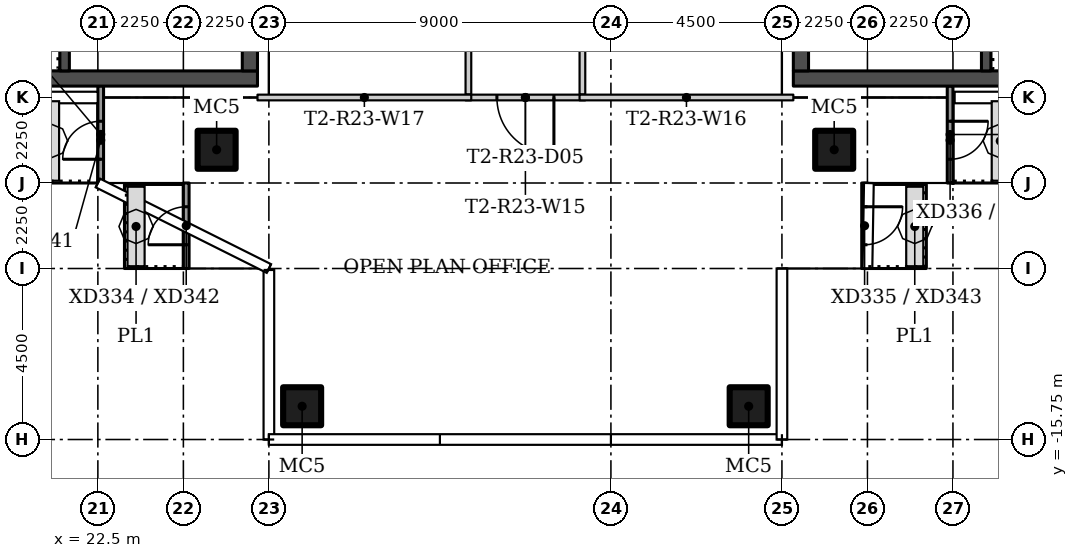
"""IFC4 building model, lengths in metres.
Left out: names, types, materials, properties, quantities, classifications, styles, units other than length and angle.
Written with IfcOpenShell. Run it as: python <this file> out.ifc"""

import sys

from ifc_helpers import new_model, si_unit, direction, frame, frame_2d, origin, origin_2d, place, context, subcontext, project, spatial, rectangle, hollow_rectangle, extrude, element, fill, save


model = new_model("IFC4")
c1 = context("Model", 3, precision=1e-05, world=origin(), true_north=direction((0.0, 1.0)))
c2 = subcontext(c1, "Body", "Model", "MODEL_VIEW")
j1 = project(units=[si_unit("LENGTHUNIT", "METRE"), si_unit("PLANEANGLEUNIT", "RADIAN")], contexts=[c1])
p1 = place(None, origin())
s1 = spatial("IfcSite", under=j1, at=p1, CompositionType="ELEMENT")
p2 = place(p1, origin())
s2 = spatial("IfcBuilding", under=s1, at=p2, CompositionType="ELEMENT")
p3 = place(p2, frame((0.0, 0.0, 210.0)))
s3 = spatial("IfcBuildingStorey", under=s2, at=p3, CompositionType="ELEMENT", Elevation=210.0)
for number, where in (
    (1, (25.625, -8.125, 0.0)),
    (2, (41.875, -8.125, 0.0)),
    (3, (39.625, -14.875, 0.0)),
    (4, (27.875, -14.875, 0.0)),
):
    element("IfcColumn", number, at=place(p3, frame(where)), inside=s3, PredefinedType="COLUMN", context=c2, shape_type="SweptSolid", body=[
        extrude(hollow_rectangle(XDim=1.0, YDim=1.0, WallThickness=0.04, at=origin_2d()), origin(), (0.0, 0.0, 1.0), 3.55),
    ])
p4 = place(p3, frame((32.25, -6.675, 0.0), z_axis=(0.0, 0.0, 1.0), x_axis=(0.0, 1.0, 0.0)))
e5 = element("IfcWall", 5, at=p4, inside=s3, PredefinedType="PARTITIONING", context=c2, shape_type="SweptSolid", body=[
    extrude(rectangle(XDim=6.65, YDim=0.15, at=frame_2d((3.325, 0.0))), origin(), (0.0, 0.0, 1.0), 3.55),
])
p5 = place(p4, frame((2.875, 0.0, 0.0)))
e6 = element("IfcOpeningElement", 6, at=p5, cuts=e5, PredefinedType="OPENING", context=c2, shape_type="SweptSolid", body=[
    extrude(rectangle(XDim=0.9, YDim=2.1, at=frame_2d((0.45, 1.05))), frame((0.0, 0.085, 0.0), z_axis=(0.0, -1.0, 0.0), x_axis=(1.0, 0.0, 0.0)), (0.0, 0.0, 1.0), 0.17),
])
p6 = place(p3, frame((35.25, -0.025, 0.0), z_axis=(0.0, 0.0, 1.0), x_axis=(0.0, -1.0, 0.0)))
e7 = element("IfcWall", 7, at=p6, inside=s3, PredefinedType="PARTITIONING", context=c2, shape_type="SweptSolid", body=[
    extrude(rectangle(XDim=6.65, YDim=0.15, at=frame_2d((3.325, 0.0))), origin(), (0.0, 0.0, 1.0), 3.55),
])
p7 = place(p6, frame((2.875, 0.0, 0.0)))
e8 = element("IfcOpeningElement", 8, at=p7, cuts=e7, PredefinedType="OPENING", context=c2, shape_type="SweptSolid", body=[
    extrude(rectangle(XDim=0.9, YDim=2.1, at=frame_2d((0.45, 1.05))), frame((0.0, 0.085, 0.0), z_axis=(0.0, -1.0, 0.0), x_axis=(1.0, 0.0, 0.0)), (0.0, 0.0, 1.0), 0.17),
])
p8 = place(p3, frame((35.325, -6.75, 0.0), z_axis=(0.0, 0.0, 1.0), x_axis=(-1.0, 0.0, 0.0)))
e9 = element("IfcWall", 9, at=p8, inside=s3, PredefinedType="PARTITIONING", context=c2, shape_type="SweptSolid", body=[
    extrude(rectangle(XDim=3.15, YDim=0.15, at=frame_2d((1.575, 0.0))), origin(), (0.0, 0.0, 1.0), 3.55),
])
p9 = place(p8, frame((0.825, 0.0, 0.0)))
e10 = element("IfcOpeningElement", 10, at=p9, cuts=e9, PredefinedType="OPENING", context=c2, shape_type="SweptSolid", body=[
    extrude(rectangle(XDim=1.5, YDim=2.1, at=frame_2d((0.75, 1.05))), frame((0.0, 0.085, 0.0), z_axis=(0.0, -1.0, 0.0), x_axis=(1.0, 0.0, 0.0)), (0.0, 0.0, 1.0), 0.17),
])
for number, where in (
    (11, (35.175, -6.75, 0.0)),
    (12, (26.7, -6.75, 0.0)),
):
    element("IfcWall", number, at=place(p3, frame(where)), inside=s3, PredefinedType="PARTITIONING", context=c2, shape_type="SweptSolid", body=[
        extrude(rectangle(XDim=5.625, YDim=0.15, at=frame_2d((2.812, 0.0))), origin(), (0.0, 0.0, 1.0), 3.55),
    ])
p10 = place(p3, frame((22.575, -9.0, 0.0), z_axis=(0.0, 0.0, 1.0), x_axis=(0.0, 1.0, 0.0)))
e13 = element("IfcWall", 13, at=p10, inside=s3, PredefinedType="SOLIDWALL", context=c2, shape_type="SweptSolid", body=[
    extrude(rectangle(XDim=2.557, YDim=0.15, at=frame_2d((1.278, 0.0))), origin(), (0.0, 0.0, 1.0), 3.45),
])
p11 = place(p10, frame((0.625, 0.0, 0.0)))
e14 = element("IfcOpeningElement", 14, at=p11, cuts=e13, PredefinedType="OPENING", context=c2, shape_type="SweptSolid", body=[
    extrude(rectangle(XDim=1.0, YDim=2.4, at=frame_2d((0.5, 1.2))), frame((0.0, 0.085, 0.0), z_axis=(0.0, -1.0, 0.0), x_axis=(1.0, 0.0, 0.0)), (0.0, 0.0, 1.0), 0.17),
])
p12 = place(p3, frame((24.825, -11.25, 0.0), z_axis=(0.0, 0.0, 1.0), x_axis=(0.0, 1.0, 0.0)))
e15 = element("IfcWall", 15, at=p12, inside=s3, PredefinedType="SOLIDWALL", context=c2, shape_type="SweptSolid", body=[
    extrude(rectangle(XDim=2.25, YDim=0.15, at=frame_2d((1.125, 0.0))), origin(), (0.0, 0.0, 1.0), 3.45),
])
p13 = place(p12, frame((0.625, 0.0, 0.0)))
e16 = element("IfcOpeningElement", 16, at=p13, cuts=e15, PredefinedType="OPENING", context=c2, shape_type="SweptSolid", body=[
    extrude(rectangle(XDim=1.0, YDim=2.4, at=frame_2d((0.5, 1.2))), frame((0.0, 0.085, 0.0), z_axis=(0.0, -1.0, 0.0), x_axis=(1.0, 0.0, 0.0)), (0.0, 0.0, 1.0), 0.17),
])
p14 = place(p3, frame((42.675, -9.0, 0.0), z_axis=(0.0, 0.0, 1.0), x_axis=(0.0, -1.0, 0.0)))
e17 = element("IfcWall", 17, at=p14, inside=s3, PredefinedType="SOLIDWALL", context=c2, shape_type="SweptSolid", body=[
    extrude(rectangle(XDim=2.25, YDim=0.15, at=frame_2d((1.125, 0.0))), origin(), (0.0, 0.0, 1.0), 3.45),
])
p15 = place(p14, frame((0.625, 0.0, 0.0)))
e18 = element("IfcOpeningElement", 18, at=p15, cuts=e17, PredefinedType="OPENING", context=c2, shape_type="SweptSolid", body=[
    extrude(rectangle(XDim=1.0, YDim=2.4, at=frame_2d((0.5, 1.2))), frame((0.0, 0.085, 0.0), z_axis=(0.0, -1.0, 0.0), x_axis=(1.0, 0.0, 0.0)), (0.0, 0.0, 1.0), 0.17),
])
p16 = place(p3, frame((44.925, -6.448, 0.0), z_axis=(0.0, 0.0, 1.0), x_axis=(0.0, -1.0, 0.0)))
e19 = element("IfcWall", 19, at=p16, inside=s3, PredefinedType="SOLIDWALL", context=c2, shape_type="SweptSolid", body=[
    extrude(rectangle(XDim=2.552, YDim=0.15, at=frame_2d((1.276, 0.0))), origin(), (0.0, 0.0, 1.0), 3.45),
])
p17 = place(p16, frame((0.927, 0.0, 0.0)))
e20 = element("IfcOpeningElement", 20, at=p17, cuts=e19, PredefinedType="OPENING", context=c2, shape_type="SweptSolid", body=[
    extrude(rectangle(XDim=1.0, YDim=2.4, at=frame_2d((0.5, 1.2))), frame((0.0, 0.085, 0.0), z_axis=(0.0, -1.0, 0.0), x_axis=(1.0, 0.0, 0.0)), (0.0, 0.0, 1.0), 0.17),
])
p18 = place(p3, frame((13.8, -6.25, 0.0)))
e21 = element("IfcWall", 21, at=p18, inside=s3, PredefinedType="SHEAR", context=c2, shape_type="SweptSolid", body=[
    extrude(rectangle(XDim=12.9, YDim=0.4, at=frame_2d((6.45, 0.0))), origin(), (0.0, 0.0, 1.0), 3.55),
])
p19 = place(p3, frame((26.5, 6.05, 0.0), z_axis=(0.0, 0.0, 1.0), x_axis=(0.0, -1.0, 0.0)))
e22 = element("IfcWall", 22, at=p19, inside=s3, PredefinedType="SHEAR", context=c2, shape_type="SweptSolid", body=[
    extrude(rectangle(XDim=12.1, YDim=0.4, at=frame_2d((6.05, 0.0))), origin(), (0.0, 0.0, 1.0), 3.55),
])
p20 = place(p19, frame((10.1, 0.0, 0.0)))
e23 = element("IfcOpeningElement", 23, at=p20, cuts=e22, PredefinedType="OPENING", context=c2, shape_type="SweptSolid", body=[
    extrude(rectangle(XDim=1.2, YDim=2.1, at=frame_2d((0.6, 1.05))), frame((0.0, 0.21, 0.0), z_axis=(0.0, -1.0, 0.0), x_axis=(1.0, 0.0, 0.0)), (0.0, 0.0, 1.0), 0.42),
])
p21 = place(p19, frame((3.9, 0.0, 0.0)))
e24 = element("IfcOpeningElement", 24, at=p21, cuts=e22, PredefinedType="OPENING", context=c2, shape_type="SweptSolid", body=[
    extrude(rectangle(XDim=1.8, YDim=2.4, at=frame_2d((0.9, 1.2))), frame((0.0, 0.21, 0.0), z_axis=(0.0, -1.0, 0.0), x_axis=(1.0, 0.0, 0.0)), (0.0, 0.0, 1.0), 0.42),
])
p22 = place(p3, frame((21.625, -6.05, 0.0), z_axis=(0.0, 0.0, 1.0), x_axis=(0.0, 1.0, 0.0)))
e25 = element("IfcWall", 25, at=p22, inside=s3, PredefinedType="SHEAR", context=c2, shape_type="SweptSolid", body=[
    extrude(rectangle(XDim=2.55, YDim=0.25, at=frame_2d((1.275, 0.0))), origin(), (0.0, 0.0, 1.0), 3.55),
])
p23 = place(p3, frame((53.7, -6.25, 0.0), z_axis=(0.0, 0.0, 1.0), x_axis=(-1.0, 0.0, 0.0)))
e26 = element("IfcWall", 26, at=p23, inside=s3, PredefinedType="SHEAR", context=c2, shape_type="SweptSolid", body=[
    extrude(rectangle(XDim=12.9, YDim=0.4, at=frame_2d((6.45, 0.0))), origin(), (0.0, 0.0, 1.0), 3.55),
])
p24 = place(p3, frame((41.0, -6.05, 0.0), z_axis=(0.0, 0.0, 1.0), x_axis=(0.0, 1.0, 0.0)))
e27 = element("IfcWall", 27, at=p24, inside=s3, PredefinedType="SHEAR", context=c2, shape_type="SweptSolid", body=[
    extrude(rectangle(XDim=12.1, YDim=0.4, at=frame_2d((6.05, 0.0))), origin(), (0.0, 0.0, 1.0), 3.55),
])
p25 = place(p24, frame((0.8, 0.0, 0.0)))
e28 = element("IfcOpeningElement", 28, at=p25, cuts=e27, PredefinedType="OPENING", context=c2, shape_type="SweptSolid", body=[
    extrude(rectangle(XDim=1.2, YDim=2.1, at=frame_2d((0.6, 1.05))), frame((0.0, 0.21, 0.0), z_axis=(0.0, -1.0, 0.0), x_axis=(1.0, 0.0, 0.0)), (0.0, 0.0, 1.0), 0.42),
])
p26 = place(p24, frame((6.4, 0.0, 0.0)))
e29 = element("IfcOpeningElement", 29, at=p26, cuts=e27, PredefinedType="OPENING", context=c2, shape_type="SweptSolid", body=[
    extrude(rectangle(XDim=1.8, YDim=2.4, at=frame_2d((0.9, 1.2))), frame((0.0, 0.21, 0.0), z_axis=(0.0, -1.0, 0.0), x_axis=(1.0, 0.0, 0.0)), (0.0, 0.0, 1.0), 0.42),
])
p27 = place(p3, frame((45.875, -6.05, 0.0), z_axis=(0.0, 0.0, 1.0), x_axis=(0.0, 1.0, 0.0)))
e30 = element("IfcWall", 30, at=p27, inside=s3, PredefinedType="SHEAR", context=c2, shape_type="SweptSolid", body=[
    extrude(rectangle(XDim=2.55, YDim=0.25, at=frame_2d((1.275, 0.0))), origin(), (0.0, 0.0, 1.0), 3.55),
])
p28 = place(p9, origin())
e31 = element("IfcDoor", 31, at=p28, inside=s3, OperationType="DOUBLE_DOOR_SINGLE_SWING", PredefinedType="DOOR", context=c2, shape_type="SweptSolid", body=[
    extrude(rectangle(XDim=1.5, YDim=2.1, at=frame_2d((0.75, 1.05))), frame((0.0, 0.025, 0.0), z_axis=(0.0, -1.0, 0.0), x_axis=(1.0, 0.0, 0.0)), (0.0, 0.0, 1.0), 0.05),
])
fill(e10, e31)
p29 = place(p11, origin())
e32 = element("IfcDoor", 32, at=p29, inside=s3, OperationType="SINGLE_SWING_LEFT", PredefinedType="DOOR", context=c2, shape_type="SweptSolid", body=[
    extrude(rectangle(XDim=1.0, YDim=2.4, at=frame_2d((0.5, 1.2))), frame((0.0, 0.025, 0.0), z_axis=(0.0, -1.0, 0.0), x_axis=(1.0, 0.0, 0.0)), (0.0, 0.0, 1.0), 0.05),
])
fill(e14, e32)
p30 = place(p13, origin())
e33 = element("IfcDoor", 33, at=p30, inside=s3, OperationType="SINGLE_SWING_RIGHT", PredefinedType="DOOR", context=c2, shape_type="SweptSolid", body=[
    extrude(rectangle(XDim=1.0, YDim=2.4, at=frame_2d((0.5, 1.2))), frame((0.0, 0.025, 0.0), z_axis=(0.0, -1.0, 0.0), x_axis=(1.0, 0.0, 0.0)), (0.0, 0.0, 1.0), 0.05),
])
fill(e16, e33)
p31 = place(p15, origin())
e34 = element("IfcDoor", 34, at=p31, inside=s3, OperationType="SINGLE_SWING_LEFT", PredefinedType="DOOR", context=c2, shape_type="SweptSolid", body=[
    extrude(rectangle(XDim=1.0, YDim=2.4, at=frame_2d((0.5, 1.2))), frame((0.0, 0.025, 0.0), z_axis=(0.0, -1.0, 0.0), x_axis=(1.0, 0.0, 0.0)), (0.0, 0.0, 1.0), 0.05),
])
fill(e18, e34)
p32 = place(p17, origin())
e35 = element("IfcDoor", 35, at=p32, inside=s3, OperationType="SINGLE_SWING_RIGHT", PredefinedType="DOOR", context=c2, shape_type="SweptSolid", body=[
    extrude(rectangle(XDim=1.0, YDim=2.4, at=frame_2d((0.5, 1.2))), frame((0.0, 0.025, 0.0), z_axis=(0.0, -1.0, 0.0), x_axis=(1.0, 0.0, 0.0)), (0.0, 0.0, 1.0), 0.05),
])
fill(e20, e35)
save(model, sys.argv[1])
